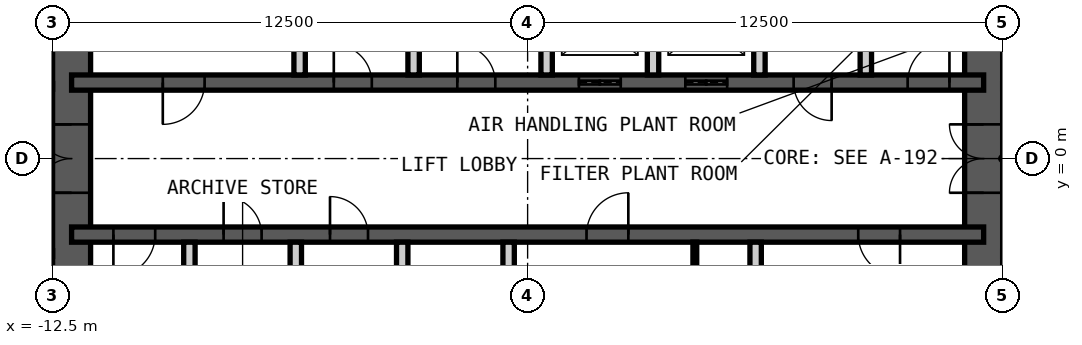
"""IFC4 building model, lengths in metres.
Left out: names, types, materials, properties, quantities, classifications, styles, units other than length and angle.
Written with IfcOpenShell. Run it as: python <this file> out.ifc"""

import sys

from ifc_helpers import new_model, si_unit, direction, frame, frame_2d, origin, place, context, subcontext, project, spatial, rectangle, extrude, element, fill, save


model = new_model("IFC4")
c1 = context("Model", 3, precision=1e-05, world=origin(), true_north=direction((0.0, 1.0)))
c2 = subcontext(c1, "Body", "Model", "MODEL_VIEW")
j1 = project(units=[si_unit("LENGTHUNIT", "METRE"), si_unit("PLANEANGLEUNIT", "RADIAN")], contexts=[c1])
p1 = place(None, origin())
s1 = spatial("IfcSite", under=j1, at=p1, CompositionType="ELEMENT")
p2 = place(p1, origin())
s2 = spatial("IfcBuilding", under=s1, at=p2, CompositionType="ELEMENT")
p3 = place(p2, frame((0.0, 0.0, 266.2)))
s3 = spatial("IfcBuildingStorey", under=s2, at=p3, CompositionType="ELEMENT", Elevation=266.2)
p4 = place(p3, frame((12.0, -9.0, 0.0), z_axis=(0.0, 0.0, 1.0), x_axis=(0.0, 1.0, 0.0)))
e1 = element("IfcWall", 1, at=p4, inside=s3, PredefinedType="SHEAR", context=c2, shape_type="SweptSolid", body=[
    extrude(rectangle(XDim=18.0, YDim=1.0, at=frame_2d((9.0, 0.0))), origin(), (0.0, 0.0, 1.0), 4.2),
])
p5 = place(p4, frame((8.1, 0.0, 0.0)))
e2 = element("IfcOpeningElement", 2, at=p5, cuts=e1, PredefinedType="OPENING", context=c2, shape_type="SweptSolid", body=[
    extrude(rectangle(XDim=1.8, YDim=2.1, at=frame_2d((0.9, 1.05))), frame((0.0, 0.51, 0.0), z_axis=(0.0, -1.0, 0.0), x_axis=(1.0, 0.0, 0.0)), (0.0, 0.0, 1.0), 1.02),
])
p6 = place(p3, frame((-12.0, -9.0, 0.0), z_axis=(0.0, 0.0, 1.0), x_axis=(0.0, 1.0, 0.0)))
e3 = element("IfcWall", 3, at=p6, inside=s3, PredefinedType="SHEAR", context=c2, shape_type="SweptSolid", body=[
    extrude(rectangle(XDim=18.0, YDim=1.0, at=frame_2d((9.0, 0.0))), origin(), (0.0, 0.0, 1.0), 4.2),
])
p7 = place(p6, frame((8.1, 0.0, 0.0)))
e4 = element("IfcOpeningElement", 4, at=p7, cuts=e3, PredefinedType="OPENING", context=c2, shape_type="SweptSolid", body=[
    extrude(rectangle(XDim=1.8, YDim=2.1, at=frame_2d((0.9, 1.05))), frame((0.0, 0.51, 0.0), z_axis=(0.0, -1.0, 0.0), x_axis=(1.0, 0.0, 0.0)), (0.0, 0.0, 1.0), 1.02),
])
p8 = place(p3, frame((-12.0, 2.0, 0.0), z_axis=(0.0, 0.0, 1.0), x_axis=(1.0, 0.0, 0.0)))
e5 = element("IfcWall", 5, at=p8, inside=s3, PredefinedType="SHEAR", context=c2, shape_type="SweptSolid", body=[
    extrude(rectangle(XDim=24.0, YDim=0.4, at=frame_2d((12.0, 0.0))), origin(), (0.0, 0.0, 1.0), 4.2),
])
p9 = place(p8, frame((2.4, 0.0, 0.0)))
e6 = element("IfcOpeningElement", 6, at=p9, cuts=e5, PredefinedType="OPENING", context=c2, shape_type="SweptSolid", body=[
    extrude(rectangle(XDim=1.1, YDim=2.1, at=frame_2d((0.55, 1.05))), frame((0.0, 0.21, 0.0), z_axis=(0.0, -1.0, 0.0), x_axis=(1.0, 0.0, 0.0)), (0.0, 0.0, 1.0), 0.42),
])
p10 = place(p8, frame((22.0, 0.0, 0.0)))
e7 = element("IfcOpeningElement", 7, at=p10, cuts=e5, PredefinedType="OPENING", context=c2, shape_type="SweptSolid", body=[
    extrude(rectangle(XDim=1.1, YDim=2.1, at=frame_2d((0.55, 1.05))), frame((0.0, 0.21, 0.0), z_axis=(0.0, -1.0, 0.0), x_axis=(1.0, 0.0, 0.0)), (0.0, 0.0, 1.0), 0.42),
])
p11 = place(p8, frame((10.15, 0.0, 0.0)))
e8 = element("IfcOpeningElement", 8, at=p11, cuts=e5, PredefinedType="OPENING", context=c2, shape_type="SweptSolid", body=[
    extrude(rectangle(XDim=1.0, YDim=2.1, at=frame_2d((0.5, 1.05))), frame((0.0, 0.21, 0.0), z_axis=(0.0, -1.0, 0.0), x_axis=(1.0, 0.0, 0.0)), (0.0, 0.0, 1.0), 0.42),
])
p12 = place(p8, frame((6.9, 0.0, 0.0)))
e9 = element("IfcOpeningElement", 9, at=p12, cuts=e5, PredefinedType="OPENING", context=c2, shape_type="SweptSolid", body=[
    extrude(rectangle(XDim=1.0, YDim=2.1, at=frame_2d((0.5, 1.05))), frame((0.0, 0.21, 0.0), z_axis=(0.0, -1.0, 0.0), x_axis=(1.0, 0.0, 0.0)), (0.0, 0.0, 1.0), 0.42),
])
p13 = place(p8, frame((13.35, 0.0, 0.0)))
e10 = element("IfcOpeningElement", 10, at=p13, cuts=e5, PredefinedType="OPENING", context=c2, shape_type="SweptSolid", body=[
    extrude(rectangle(XDim=1.1, YDim=2.4, at=frame_2d((0.55, 1.2))), frame((0.0, 0.21, 0.0), z_axis=(0.0, -1.0, 0.0), x_axis=(1.0, 0.0, 0.0)), (0.0, 0.0, 1.0), 0.42),
])
p14 = place(p8, frame((16.15, 0.0, 0.0)))
e11 = element("IfcOpeningElement", 11, at=p14, cuts=e5, PredefinedType="OPENING", context=c2, shape_type="SweptSolid", body=[
    extrude(rectangle(XDim=1.1, YDim=2.4, at=frame_2d((0.55, 1.2))), frame((0.0, 0.21, 0.0), z_axis=(0.0, -1.0, 0.0), x_axis=(1.0, 0.0, 0.0)), (0.0, 0.0, 1.0), 0.42),
])
p15 = place(p8, frame((19.0, 0.0, 0.0)))
e12 = element("IfcOpeningElement", 12, at=p15, cuts=e5, PredefinedType="OPENING", context=c2, shape_type="SweptSolid", body=[
    extrude(rectangle(XDim=1.0, YDim=2.1, at=frame_2d((0.5, 1.05))), frame((0.0, 0.21, 0.0), z_axis=(0.0, -1.0, 0.0), x_axis=(1.0, 0.0, 0.0)), (0.0, 0.0, 1.0), 0.42),
])
p16 = place(p3, frame((-12.0, -2.0, 0.0), z_axis=(0.0, 0.0, 1.0), x_axis=(1.0, 0.0, 0.0)))
e13 = element("IfcWall", 13, at=p16, inside=s3, PredefinedType="SHEAR", context=c2, shape_type="SweptSolid", body=[
    extrude(rectangle(XDim=24.0, YDim=0.4, at=frame_2d((12.0, 0.0))), origin(), (0.0, 0.0, 1.0), 4.2),
])
p17 = place(p16, frame((1.1, 0.0, 0.0)))
e14 = element("IfcOpeningElement", 14, at=p17, cuts=e13, PredefinedType="OPENING", context=c2, shape_type="SweptSolid", body=[
    extrude(rectangle(XDim=1.1, YDim=2.1, at=frame_2d((0.55, 1.05))), frame((0.0, 0.21, 0.0), z_axis=(0.0, -1.0, 0.0), x_axis=(1.0, 0.0, 0.0)), (0.0, 0.0, 1.0), 0.42),
])
p18 = place(p16, frame((13.55, 0.0, 0.0)))
e15 = element("IfcOpeningElement", 15, at=p18, cuts=e13, PredefinedType="OPENING", context=c2, shape_type="SweptSolid", body=[
    extrude(rectangle(XDim=1.1, YDim=2.1, at=frame_2d((0.55, 1.05))), frame((0.0, 0.21, 0.0), z_axis=(0.0, -1.0, 0.0), x_axis=(1.0, 0.0, 0.0)), (0.0, 0.0, 1.0), 0.42),
])
p19 = place(p16, frame((20.7, 0.0, 0.0)))
e16 = element("IfcOpeningElement", 16, at=p19, cuts=e13, PredefinedType="OPENING", context=c2, shape_type="SweptSolid", body=[
    extrude(rectangle(XDim=1.1, YDim=2.1, at=frame_2d((0.55, 1.05))), frame((0.0, 0.21, 0.0), z_axis=(0.0, -1.0, 0.0), x_axis=(1.0, 0.0, 0.0)), (0.0, 0.0, 1.0), 0.42),
])
p20 = place(p16, frame((4.0, 0.0, 0.0)))
e17 = element("IfcOpeningElement", 17, at=p20, cuts=e13, PredefinedType="OPENING", context=c2, shape_type="SweptSolid", body=[
    extrude(rectangle(XDim=1.0, YDim=2.1, at=frame_2d((0.5, 1.05))), frame((0.0, 0.21, 0.0), z_axis=(0.0, -1.0, 0.0), x_axis=(1.0, 0.0, 0.0)), (0.0, 0.0, 1.0), 0.42),
])
p21 = place(p16, frame((6.8, 0.0, 0.0)))
e18 = element("IfcOpeningElement", 18, at=p21, cuts=e13, PredefinedType="OPENING", context=c2, shape_type="SweptSolid", body=[
    extrude(rectangle(XDim=1.0, YDim=2.1, at=frame_2d((0.5, 1.05))), frame((0.0, 0.21, 0.0), z_axis=(0.0, -1.0, 0.0), x_axis=(1.0, 0.0, 0.0)), (0.0, 0.0, 1.0), 0.42),
])
for number, where, z_axis, x_axis in (
    (19, (-6.0, 2.2, 0.0), (0.0, 0.0, 1.0), (0.0, 1.0, 0.0)),
    (20, (-3.0, 2.2, 0.0), (0.0, 0.0, 1.0), (0.0, 1.0, 0.0)),
    (21, (0.5, 2.2, 0.0), (0.0, 0.0, 1.0), (0.0, 1.0, 0.0)),
    (22, (3.3, 2.2, 0.0), (0.0, 0.0, 1.0), (0.0, 1.0, 0.0)),
    (23, (6.1, 2.2, 0.0), (0.0, 0.0, 1.0), (0.0, 1.0, 0.0)),
    (24, (8.9, 2.2, 0.0), (0.0, 0.0, 1.0), (0.0, 1.0, 0.0)),
    (25, (-8.9, -4.85, 0.0), (0.0, 0.0, 1.0), (0.0, 1.0, 0.0)),
    (26, (-6.1, -4.85, 0.0), (0.0, 0.0, 1.0), (0.0, 1.0, 0.0)),
    (27, (-3.3, -4.85, 0.0), (0.0, 0.0, 1.0), (0.0, 1.0, 0.0)),
    (28, (-0.5, -4.85, 0.0), (0.0, 0.0, 1.0), (0.0, 1.0, 0.0)),
    (29, (6.0, -4.85, 0.0), (0.0, 0.0, 1.0), (0.0, 1.0, 0.0)),
):
    element("IfcWall", number, at=place(p3, frame(where, z_axis=z_axis, x_axis=x_axis)), inside=s3, PredefinedType="PARTITIONING", context=c2, shape_type="SweptSolid", body=[
        extrude(rectangle(XDim=2.65, YDim=0.3, at=frame_2d((1.325, 0.0))), origin(), (0.0, 0.0, 1.0), 3.98),
    ])
p22 = place(p3, frame((4.4, -4.85, 0.0), z_axis=(0.0, 0.0, 1.0), x_axis=(0.0, 1.0, 0.0)))
e30 = element("IfcWall", 30, at=p22, inside=s3, PredefinedType="PARTITIONING", context=c2, shape_type="SweptSolid", body=[
    extrude(rectangle(XDim=2.65, YDim=0.1, at=frame_2d((1.325, 0.0))), origin(), (0.0, 0.0, 1.0), 3.98),
])
p23 = place(p22, frame((0.1, 0.0, 0.0)))
e31 = element("IfcOpeningElement", 31, at=p23, cuts=e30, PredefinedType="OPENING", context=c2, shape_type="SweptSolid", body=[
    extrude(rectangle(XDim=1.0, YDim=2.4, at=frame_2d((0.5, 1.2))), frame((0.0, 0.06, 0.0), z_axis=(0.0, -1.0, 0.0), x_axis=(1.0, 0.0, 0.0)), (0.0, 0.0, 1.0), 0.12),
])
p24 = place(p9, origin())
e32 = element("IfcDoor", 32, at=p24, inside=s3, OperationType="SINGLE_SWING_LEFT", PredefinedType="DOOR", context=c2, shape_type="SweptSolid", body=[
    extrude(rectangle(XDim=1.1, YDim=2.1, at=frame_2d((0.55, 1.05))), frame((0.0, 0.025, 0.0), z_axis=(0.0, -1.0, 0.0), x_axis=(1.0, 0.0, 0.0)), (0.0, 0.0, 1.0), 0.05),
])
fill(e6, e32)
p25 = place(p17, origin())
e33 = element("IfcDoor", 33, at=p25, inside=s3, OperationType="SINGLE_SWING_LEFT", PredefinedType="DOOR", context=c2, shape_type="SweptSolid", body=[
    extrude(rectangle(XDim=1.1, YDim=2.1, at=frame_2d((0.55, 1.05))), frame((0.0, 0.025, 0.0), z_axis=(0.0, -1.0, 0.0), x_axis=(1.0, 0.0, 0.0)), (0.0, 0.0, 1.0), 0.05),
])
fill(e14, e33)
p26 = place(p10, origin())
e34 = element("IfcDoor", 34, at=p26, inside=s3, OperationType="SINGLE_SWING_LEFT", PredefinedType="DOOR", context=c2, shape_type="SweptSolid", body=[
    extrude(rectangle(XDim=1.1, YDim=2.1, at=frame_2d((0.55, 1.05))), frame((0.0, 0.025, 0.0), z_axis=(0.0, -1.0, 0.0), x_axis=(1.0, 0.0, 0.0)), (0.0, 0.0, 1.0), 0.05),
])
fill(e7, e34)
p27 = place(p11, origin())
e35 = element("IfcDoor", 35, at=p27, inside=s3, OperationType="SINGLE_SWING_RIGHT", PredefinedType="DOOR", context=c2, shape_type="SweptSolid", body=[
    extrude(rectangle(XDim=1.0, YDim=2.1, at=frame_2d((0.5, 1.05))), frame((0.0, 0.025, 0.0), z_axis=(0.0, -1.0, 0.0), x_axis=(1.0, 0.0, 0.0)), (0.0, 0.0, 1.0), 0.05),
])
fill(e8, e35)
p28 = place(p18, origin())
e36 = element("IfcDoor", 36, at=p28, inside=s3, OperationType="SINGLE_SWING_LEFT", PredefinedType="DOOR", context=c2, shape_type="SweptSolid", body=[
    extrude(rectangle(XDim=1.1, YDim=2.1, at=frame_2d((0.55, 1.05))), frame((0.0, 0.025, 0.0), z_axis=(0.0, -1.0, 0.0), x_axis=(1.0, 0.0, 0.0)), (0.0, 0.0, 1.0), 0.05),
])
fill(e15, e36)
p29 = place(p19, origin())
e37 = element("IfcDoor", 37, at=p29, inside=s3, OperationType="SINGLE_SWING_RIGHT", PredefinedType="DOOR", context=c2, shape_type="SweptSolid", body=[
    extrude(rectangle(XDim=1.1, YDim=2.1, at=frame_2d((0.55, 1.05))), frame((0.0, 0.025, 0.0), z_axis=(0.0, -1.0, 0.0), x_axis=(1.0, 0.0, 0.0)), (0.0, 0.0, 1.0), 0.05),
])
fill(e16, e37)
p30 = place(p5, origin())
e38 = element("IfcDoor", 38, at=p30, inside=s3, OperationType="DOUBLE_DOOR_DOUBLE_SWING", PredefinedType="DOOR", context=c2, shape_type="SweptSolid", body=[
    extrude(rectangle(XDim=1.8, YDim=2.1, at=frame_2d((0.9, 1.05))), frame((0.0, 0.025, 0.0), z_axis=(0.0, -1.0, 0.0), x_axis=(1.0, 0.0, 0.0)), (0.0, 0.0, 1.0), 0.05),
])
fill(e2, e38)
p31 = place(p7, origin())
e39 = element("IfcDoor", 39, at=p31, inside=s3, OperationType="DOUBLE_DOOR_DOUBLE_SWING", PredefinedType="DOOR", context=c2, shape_type="SweptSolid", body=[
    extrude(rectangle(XDim=1.8, YDim=2.1, at=frame_2d((0.9, 1.05))), frame((0.0, 0.025, 0.0), z_axis=(0.0, -1.0, 0.0), x_axis=(1.0, 0.0, 0.0)), (0.0, 0.0, 1.0), 0.05),
])
fill(e4, e39)
p32 = place(p12, origin())
e40 = element("IfcDoor", 40, at=p32, inside=s3, OperationType="SINGLE_SWING_RIGHT", PredefinedType="DOOR", context=c2, shape_type="SweptSolid", body=[
    extrude(rectangle(XDim=1.0, YDim=2.1, at=frame_2d((0.5, 1.05))), frame((0.0, 0.025, 0.0), z_axis=(0.0, -1.0, 0.0), x_axis=(1.0, 0.0, 0.0)), (0.0, 0.0, 1.0), 0.05),
])
fill(e9, e40)
p33 = place(p13, origin())
e41 = element("IfcDoor", 41, at=p33, inside=s3, OperationType="DOUBLE_DOOR_SLIDING", PredefinedType="DOOR", context=c2, shape_type="SweptSolid", body=[
    extrude(rectangle(XDim=1.1, YDim=2.4, at=frame_2d((0.55, 1.2))), frame((0.0, 0.025, 0.0), z_axis=(0.0, -1.0, 0.0), x_axis=(1.0, 0.0, 0.0)), (0.0, 0.0, 1.0), 0.05),
])
fill(e10, e41)
p34 = place(p14, origin())
e42 = element("IfcDoor", 42, at=p34, inside=s3, OperationType="DOUBLE_DOOR_SLIDING", PredefinedType="DOOR", context=c2, shape_type="SweptSolid", body=[
    extrude(rectangle(XDim=1.1, YDim=2.4, at=frame_2d((0.55, 1.2))), frame((0.0, 0.025, 0.0), z_axis=(0.0, -1.0, 0.0), x_axis=(1.0, 0.0, 0.0)), (0.0, 0.0, 1.0), 0.05),
])
fill(e11, e42)
p35 = place(p15, origin())
e43 = element("IfcDoor", 43, at=p35, inside=s3, OperationType="SINGLE_SWING_RIGHT", PredefinedType="DOOR", context=c2, shape_type="SweptSolid", body=[
    extrude(rectangle(XDim=1.0, YDim=2.1, at=frame_2d((0.5, 1.05))), frame((0.0, 0.025, 0.0), z_axis=(0.0, -1.0, 0.0), x_axis=(1.0, 0.0, 0.0)), (0.0, 0.0, 1.0), 0.05),
])
fill(e12, e43)
p36 = place(p20, origin())
e44 = element("IfcDoor", 44, at=p36, inside=s3, OperationType="SINGLE_SWING_RIGHT", PredefinedType="DOOR", context=c2, shape_type="SweptSolid", body=[
    extrude(rectangle(XDim=1.0, YDim=2.1, at=frame_2d((0.5, 1.05))), frame((0.0, 0.025, 0.0), z_axis=(0.0, -1.0, 0.0), x_axis=(1.0, 0.0, 0.0)), (0.0, 0.0, 1.0), 0.05),
])
fill(e17, e44)
p37 = place(p21, origin())
e45 = element("IfcDoor", 45, at=p37, inside=s3, OperationType="SINGLE_SWING_RIGHT", PredefinedType="DOOR", context=c2, shape_type="SweptSolid", body=[
    extrude(rectangle(XDim=1.0, YDim=2.1, at=frame_2d((0.5, 1.05))), frame((0.0, 0.025, 0.0), z_axis=(0.0, -1.0, 0.0), x_axis=(1.0, 0.0, 0.0)), (0.0, 0.0, 1.0), 0.05),
])
fill(e18, e45)
save(model, sys.argv[1])
